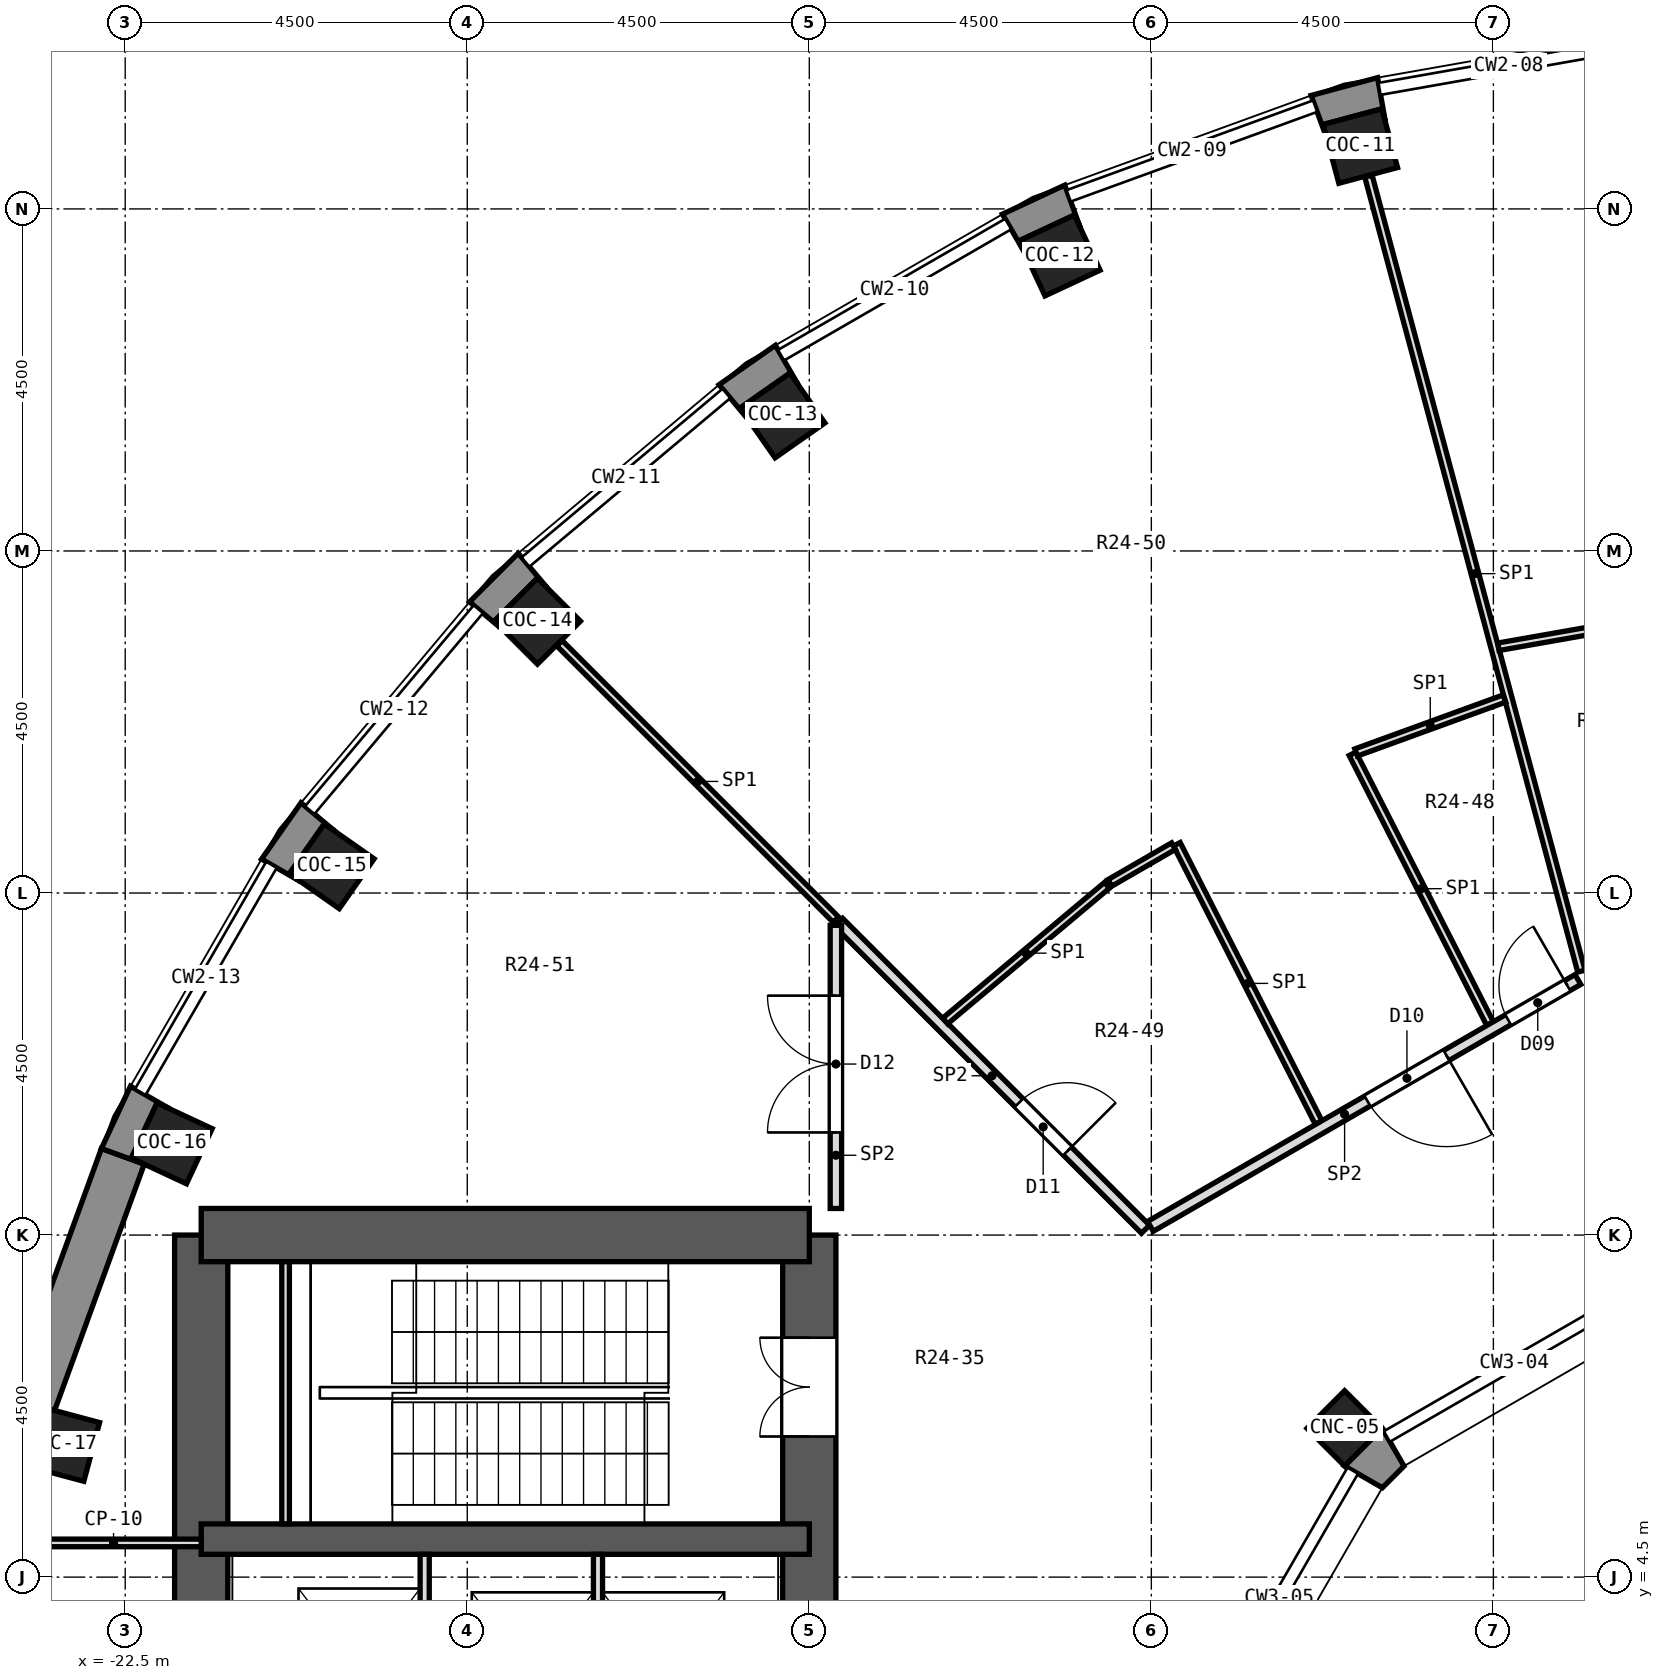
"""IFC4 building model, lengths in metres.
Left out: names, types, materials, properties, quantities, classifications, styles, units other than length and angle.
Written with IfcOpenShell. Run it as: python <this file> out.ifc"""

import sys

from ifc_helpers import new_model, si_unit, direction, frame, frame_2d, origin, origin_2d, place, context, subcontext, project, spatial, polyline, rectangle, outline, extrude, element, fill, save


model = new_model("IFC4")
c1 = context("Model", 3, precision=1e-05, world=origin(), true_north=direction((0.0, 1.0)))
c2 = subcontext(c1, "Body", "Model", "MODEL_VIEW")
j1 = project(units=[si_unit("LENGTHUNIT", "METRE"), si_unit("PLANEANGLEUNIT", "RADIAN")], contexts=[c1])
p1 = place(None, origin())
s1 = spatial("IfcSite", under=j1, at=p1, CompositionType="ELEMENT")
p2 = place(p1, origin())
s2 = spatial("IfcBuilding", under=s1, at=p2, CompositionType="ELEMENT")
p3 = place(p2, frame((0.0, 0.0, 155.8)))
s3 = spatial("IfcBuildingStorey", under=s2, at=p3, CompositionType="ELEMENT", Elevation=155.8)
for number, where, z_axis, x_axis in (
    (1, (-6.25, 23.327, -0.55), (0.0, 0.0, 1.0), (-0.259, 0.966, 0.0)),
    (2, (-10.206, 21.887, -0.55), (0.0, 0.0, 1.0), (-0.423, 0.906, 0.0)),
    (3, (-13.852, 19.782, -0.55), (0.0, 0.0, 1.0), (-0.574, 0.819, 0.0)),
    (4, (-17.077, 17.077, -0.55), (0.0, 0.0, 1.0), (-0.707, 0.707, 0.0)),
    (5, (-19.782, 13.852, -0.55), (0.0, 0.0, 1.0), (-0.819, 0.574, 0.0)),
    (6, (-21.887, 10.206, -0.55), (0.0, 0.0, 1.0), (-0.906, 0.423, 0.0)),
    (7, (-23.327, 6.25, -0.55), (0.0, 0.0, 1.0), (-0.966, 0.259, 0.0)),
):
    element("IfcColumn", number, at=place(p3, frame(where, z_axis=z_axis, x_axis=x_axis)), inside=s3, PredefinedType="COLUMN", context=c2, shape_type="SweptSolid", body=[
        extrude(rectangle(XDim=0.8, YDim=0.8, at=origin_2d()), origin(), (0.0, 0.0, 1.0), 5.55),
    ])
p4 = place(p3, frame((-6.458, 6.458, 0.0), z_axis=(0.0, 0.0, 1.0), x_axis=(-0.707106781187, 0.707106781187, 0.0)))
e8 = element("IfcColumn", 8, at=p4, inside=s3, PredefinedType="COLUMN", context=c2, shape_type="SweptSolid", body=[
    extrude(rectangle(XDim=0.7, YDim=0.7, at=origin_2d()), origin(), (0.0, 0.0, 1.0), 5.0),
])
p5 = place(p3, frame((-13.5, -9.0, 0.0), z_axis=(0.0, 0.0, 1.0), x_axis=(0.0, 1.0, 0.0)))
e9 = element("IfcWall", 9, at=p5, inside=s3, PredefinedType="SHEAR", context=c2, shape_type="SweptSolid", body=[
    extrude(rectangle(XDim=18.0, YDim=0.7, at=frame_2d((9.0, 0.0))), origin(), (0.0, 0.0, 1.0), 5.0),
])
p6 = place(p5, frame((15.35, 0.0, 0.0)))
e10 = element("IfcOpeningElement", 10, at=p6, cuts=e9, PredefinedType="OPENING", context=c2, shape_type="SweptSolid", body=[
    extrude(rectangle(XDim=1.3, YDim=2.1, at=frame_2d((0.65, 1.05))), frame((0.0, 0.362, 0.0), z_axis=(0.0, -1.0, 0.0), x_axis=(1.0, 0.0, 0.0)), (0.0, 0.0, 1.0), 0.724),
])
p7 = place(p5, frame((1.35, 0.0, 0.0)))
e11 = element("IfcOpeningElement", 11, at=p7, cuts=e9, PredefinedType="OPENING", context=c2, shape_type="SweptSolid", body=[
    extrude(rectangle(XDim=1.3, YDim=2.1, at=frame_2d((0.65, 1.05))), frame((0.0, 0.362, 0.0), z_axis=(0.0, -1.0, 0.0), x_axis=(1.0, 0.0, 0.0)), (0.0, 0.0, 1.0), 0.724),
])
p8 = place(p5, frame((7.5, 0.0, 0.0)))
e12 = element("IfcOpeningElement", 12, at=p8, cuts=e9, PredefinedType="OPENING", context=c2, shape_type="SweptSolid", body=[
    extrude(rectangle(XDim=3.0, YDim=2.4, at=frame_2d((1.5, 1.2))), frame((0.0, 0.362, 0.0), z_axis=(0.0, -1.0, 0.0), x_axis=(1.0, 0.0, 0.0)), (0.0, 0.0, 1.0), 0.724),
])
p9 = place(p3, frame((-21.5, -9.0, 0.0), z_axis=(0.0, 0.0, 1.0), x_axis=(0.0, 1.0, 0.0)))
e13 = element("IfcWall", 13, at=p9, inside=s3, PredefinedType="SHEAR", context=c2, shape_type="SweptSolid", body=[
    extrude(rectangle(XDim=18.0, YDim=0.7, at=frame_2d((9.0, 0.0))), origin(), (0.0, 0.0, 1.0), 5.0),
])
p10 = place(p9, frame((9.45, 0.0, 0.0)))
e14 = element("IfcOpeningElement", 14, at=p10, cuts=e13, PredefinedType="OPENING", context=c2, shape_type="SweptSolid", body=[
    extrude(rectangle(XDim=0.9, YDim=2.1, at=frame_2d((0.45, 1.05))), frame((0.0, 0.362, 0.0), z_axis=(0.0, -1.0, 0.0), x_axis=(1.0, 0.0, 0.0)), (0.0, 0.0, 1.0), 0.724),
])
p11 = place(p9, frame((7.65, 0.0, 0.0)))
e15 = element("IfcOpeningElement", 15, at=p11, cuts=e13, PredefinedType="OPENING", context=c2, shape_type="SweptSolid", body=[
    extrude(rectangle(XDim=0.9, YDim=2.1, at=frame_2d((0.45, 1.05))), frame((0.0, 0.362, 0.0), z_axis=(0.0, -1.0, 0.0), x_axis=(1.0, 0.0, 0.0)), (0.0, 0.0, 1.0), 0.724),
])
p12 = place(p3, frame((-13.5, 9.0, 0.0), z_axis=(0.0, 0.0, 1.0), x_axis=(-1.0, 0.0, 0.0)))
e16 = element("IfcWall", 16, at=p12, inside=s3, PredefinedType="SHEAR", context=c2, shape_type="SweptSolid", body=[
    extrude(rectangle(XDim=8.0, YDim=0.7, at=frame_2d((4.0, 0.0))), origin(), (0.0, 0.0, 1.0), 5.0),
])
p13 = place(p3, frame((-13.5, 5.0, 0.0), z_axis=(0.0, 0.0, 1.0), x_axis=(-1.0, 0.0, 0.0)))
e17 = element("IfcWall", 17, at=p13, inside=s3, PredefinedType="SHEAR", context=c2, shape_type="SweptSolid", body=[
    extrude(rectangle(XDim=8.0, YDim=0.4, at=frame_2d((4.0, 0.0))), origin(), (0.0, 0.0, 1.0), 5.0),
])
p14 = place(p3, frame((-22.531, 10.036, 0.0), z_axis=(0.0, 0.0, 1.0), x_axis=(-0.342032843455, -0.93968799822, 0.0)))
e18 = element("IfcWall", 18, at=p14, inside=s3, PredefinedType="SOLIDWALL", context=c2, shape_type="SweptSolid", body=[
    extrude(rectangle(XDim=3.45, YDim=0.6, at=frame_2d((1.725, 0.0))), origin(), (0.0, 0.0, 1.0), 4.55),
])
p15 = place(p3, origin())
e19 = element("IfcWall", 19, at=p15, inside=s3, PredefinedType="SOLIDWALL", context=c2, shape_type="SweptSolid", body=[
    extrude(outline(polyline([(-6.023, 24.227), (-6.897, 23.993), (-6.692, 23.429), (-6.74, 23.61), (-5.968, 23.817), (-5.919, 23.636), (-6.023, 24.227)])), origin(), (0.0, 0.0, 1.0), 4.55),
])
p16 = place(p3, origin())
e20 = element("IfcWall", 20, at=p16, inside=s3, PredefinedType="SOLIDWALL", context=c2, shape_type="SweptSolid", body=[
    extrude(outline(polyline([(-10.959, 22.431), (-10.659, 21.911), (-10.738, 22.081), (-10.013, 22.419), (-9.934, 22.249), (-10.139, 22.813), (-10.959, 22.431)])), origin(), (0.0, 0.0, 1.0), 4.55),
])
p17 = place(p3, origin())
e21 = element("IfcWall", 21, at=p17, inside=s3, PredefinedType="SOLIDWALL", context=c2, shape_type="SweptSolid", body=[
    extrude(outline(polyline([(-13.946, 20.706), (-14.687, 20.187), (-14.302, 19.727), (-14.409, 19.881), (-13.754, 20.34), (-13.646, 20.186), (-13.946, 20.706)])), origin(), (0.0, 0.0, 1.0), 4.55),
])
p18 = place(p3, origin())
e22 = element("IfcWall", 22, at=p18, inside=s3, PredefinedType="SOLIDWALL", context=c2, shape_type="SweptSolid", body=[
    extrude(outline(polyline([(-17.969, 17.33), (-17.51, 16.944), (-17.642, 17.077), (-17.077, 17.642), (-16.944, 17.51), (-17.33, 17.969), (-17.969, 17.33)])), origin(), (0.0, 0.0, 1.0), 4.55),
])
p19 = place(p3, origin())
e23 = element("IfcWall", 23, at=p19, inside=s3, PredefinedType="SOLIDWALL", context=c2, shape_type="SweptSolid", body=[
    extrude(outline(polyline([(-20.187, 14.687), (-20.706, 13.946), (-20.186, 13.646), (-20.34, 13.754), (-19.881, 14.409), (-19.727, 14.302), (-20.187, 14.687)])), origin(), (0.0, 0.0, 1.0), 4.55),
])
p20 = place(p3, origin())
e24 = element("IfcWall", 24, at=p20, inside=s3, PredefinedType="SOLIDWALL", context=c2, shape_type="SweptSolid", body=[
    extrude(outline(polyline([(-22.813, 10.139), (-22.249, 9.934), (-22.419, 10.013), (-22.081, 10.738), (-21.911, 10.659), (-22.431, 10.959), (-22.813, 10.139)])), origin(), (0.0, 0.0, 1.0), 4.55),
])
p21 = place(p3, origin())
e25 = element("IfcWall", 25, at=p21, inside=s3, PredefinedType="SOLIDWALL", context=c2, shape_type="SweptSolid", body=[
    extrude(outline(polyline([(-24.227, 6.023), (-23.636, 5.919), (-23.817, 5.968), (-23.61, 6.74), (-23.429, 6.692), (-23.993, 6.897), (-24.227, 6.023)])), origin(), (0.0, 0.0, 1.0), 4.55),
])
p22 = place(p3, origin())
e26 = element("IfcWall", 26, at=p22, inside=s3, PredefinedType="SOLIDWALL", context=c2, shape_type="SweptSolid", body=[
    extrude(outline(polyline([(-6.458, 5.962), (-5.961, 5.676), (-5.676, 5.961), (-5.962, 6.458), (-6.458, 5.962)])), origin(), (0.0, 0.0, 1.0), 4.55),
])
p23 = place(p3, frame((-6.144, 22.931, 0.0), z_axis=(0.0, 0.0, 1.0), x_axis=(0.258715046682, -0.965953686582, 0.0)))
e27 = element("IfcWall", 27, at=p23, inside=s3, PredefinedType="PARTITIONING", context=c2, shape_type="SweptSolid", body=[
    extrude(rectangle(XDim=10.828, YDim=0.1, at=frame_2d((5.414, 0.0))), origin(), (0.0, 0.0, 1.0), 4.55),
])
p24 = place(p3, frame((-8.665, 14.142, 0.0), z_axis=(0.0, 0.0, 1.0), x_axis=(0.453972049437, -0.891015924847, 0.0)))
e28 = element("IfcWall", 28, at=p24, inside=s3, PredefinedType="PARTITIONING", context=c2, shape_type="SweptSolid", body=[
    extrude(rectangle(XDim=4.11, YDim=0.1, at=frame_2d((2.055, 0.0))), origin(), (0.0, 0.0, 1.0), 4.55),
])
p25 = place(p3, frame((-6.353, 15.332, 0.0), z_axis=(0.0, 0.0, 1.0), x_axis=(0.454013892244, -0.890994604725, 0.0)))
e29 = element("IfcWall", 29, at=p25, inside=s3, PredefinedType="PARTITIONING", context=c2, shape_type="SweptSolid", body=[
    extrude(rectangle(XDim=3.985, YDim=0.1, at=frame_2d((1.992, 0.0))), origin(), (0.0, 0.0, 1.0), 4.55),
])
p26 = place(p3, frame((-16.787, 16.787, 0.0), z_axis=(0.0, 0.0, 1.0), x_axis=(0.707106781187, -0.707106781187, 0.0)))
e30 = element("IfcWall", 30, at=p26, inside=s3, PredefinedType="PARTITIONING", context=c2, shape_type="SweptSolid", body=[
    extrude(rectangle(XDim=5.143, YDim=0.1, at=frame_2d((2.572, 0.0))), origin(), (0.0, 0.0, 1.0), 4.55),
])
p27 = place(p3, frame((-13.115, 13.115, 0.0), z_axis=(0.0, 0.0, 1.0), x_axis=(0.707106781187, -0.707106781187, 0.0)))
e31 = element("IfcWall", 31, at=p27, inside=s3, PredefinedType="PARTITIONING", context=c2, shape_type="SweptSolid", body=[
    extrude(rectangle(XDim=5.71, YDim=0.15, at=frame_2d((2.855, 0.0))), origin(), (0.0, 0.0, 1.0), 4.55),
])
p28 = place(p27, frame((3.357, 0.0, 0.0)))
e32 = element("IfcOpeningElement", 32, at=p28, cuts=e31, PredefinedType="OPENING", context=c2, shape_type="SweptSolid", body=[
    extrude(rectangle(XDim=0.9, YDim=2.1, at=frame_2d((0.45, 1.05))), frame((0.0, 0.087, 0.0), z_axis=(0.0, -1.0, 0.0), x_axis=(1.0, 0.0, 0.0)), (0.0, 0.0, 1.0), 0.174),
])
p29 = place(p3, frame((-4.434, 16.74, 0.0), z_axis=(0.0, 0.0, 1.0), x_axis=(0.984855167118, 0.173379063906, 0.0)))
e33 = element("IfcWall", 33, at=p29, inside=s3, PredefinedType="PARTITIONING", context=c2, shape_type="SweptSolid", body=[
    extrude(rectangle(XDim=2.674, YDim=0.1, at=frame_2d((1.337, 0.0))), origin(), (0.0, 0.0, 1.0), 4.55),
])
p30 = place(p3, frame((-6.306, 15.349, 0.0), z_axis=(0.0, 0.0, 1.0), x_axis=(0.939748778635, 0.341865811474, 0.0)))
e34 = element("IfcWall", 34, at=p30, inside=s3, PredefinedType="PARTITIONING", context=c2, shape_type="SweptSolid", body=[
    extrude(rectangle(XDim=2.076, YDim=0.1, at=frame_2d((1.038, 0.0))), origin(), (0.0, 0.0, 1.0), 4.55),
])
p31 = place(p3, frame((-9.012, 9.115, 0.0), z_axis=(0.0, 0.0, 1.0), x_axis=(0.865967095912, 0.5001009786, 0.0)))
e35 = element("IfcWall", 35, at=p31, inside=s3, PredefinedType="PARTITIONING", context=c2, shape_type="SweptSolid", body=[
    extrude(rectangle(XDim=6.495, YDim=0.15, at=frame_2d((3.248, 0.0))), origin(), (0.0, 0.0, 1.0), 4.55),
])
p32 = place(p31, frame((5.434, 0.0, 0.0)))
e36 = element("IfcOpeningElement", 36, at=p32, cuts=e35, PredefinedType="OPENING", context=c2, shape_type="SweptSolid", body=[
    extrude(rectangle(XDim=0.9, YDim=2.1, at=frame_2d((0.45, 1.05))), frame((0.0, 0.087, 0.0), z_axis=(0.0, -1.0, 0.0), x_axis=(1.0, 0.0, 0.0)), (0.0, 0.0, 1.0), 0.174),
])
p33 = place(p31, frame((3.297, 0.0, 0.0)))
e37 = element("IfcOpeningElement", 37, at=p33, cuts=e35, PredefinedType="OPENING", context=c2, shape_type="SweptSolid", body=[
    extrude(rectangle(XDim=1.2, YDim=2.1, at=frame_2d((0.6, 1.05))), frame((0.0, 0.087, 0.0), z_axis=(0.0, -1.0, 0.0), x_axis=(1.0, 0.0, 0.0)), (0.0, 0.0, 1.0), 0.174),
])
p34 = place(p3, frame((-9.546, 13.633, 0.0), z_axis=(0.0, 0.0, 1.0), x_axis=(0.865903940918, 0.500210320868, 0.0)))
e38 = element("IfcWall", 38, at=p34, inside=s3, PredefinedType="PARTITIONING", context=c2, shape_type="SweptSolid", body=[
    extrude(rectangle(XDim=0.967, YDim=0.1, at=frame_2d((0.484, 0.0))), origin(), (0.0, 0.0, 1.0), 4.55),
])
p35 = place(p3, frame((-11.711, 11.817, 0.0), z_axis=(0.0, 0.0, 1.0), x_axis=(0.76626417204, 0.642525656023, 0.0)))
e39 = element("IfcWall", 39, at=p35, inside=s3, PredefinedType="PARTITIONING", context=c2, shape_type="SweptSolid", body=[
    extrude(rectangle(XDim=2.776, YDim=0.1, at=frame_2d((1.388, 0.0))), origin(), (0.0, 0.0, 1.0), 4.55),
])
p36 = place(p3, frame((-13.15, 9.35, 0.0), z_axis=(0.0, 0.0, 1.0), x_axis=(0.0, 1.0, 0.0)))
e40 = element("IfcWall", 40, at=p36, inside=s3, PredefinedType="PARTITIONING", context=c2, shape_type="SweptSolid", body=[
    extrude(rectangle(XDim=3.725, YDim=0.15, at=frame_2d((1.862, 0.0))), origin(), (0.0, 0.0, 1.0), 4.55),
])
p37 = place(p36, frame((1.0, 0.0, 0.0)))
e41 = element("IfcOpeningElement", 41, at=p37, cuts=e40, PredefinedType="OPENING", context=c2, shape_type="SweptSolid", body=[
    extrude(rectangle(XDim=1.8, YDim=2.1, at=frame_2d((0.9, 1.05))), frame((0.0, 0.087, 0.0), z_axis=(0.0, -1.0, 0.0), x_axis=(1.0, 0.0, 0.0)), (0.0, 0.0, 1.0), 0.174),
])
p38 = place(p3, frame((-21.5, 4.95, 0.0), z_axis=(0.0, 0.0, 1.0), x_axis=(-1.0, 0.0, 0.0)))
e42 = element("IfcWall", 42, at=p38, inside=s3, PredefinedType="PARTITIONING", context=c2, shape_type="SweptSolid", body=[
    extrude(rectangle(XDim=2.307, YDim=0.1, at=frame_2d((1.153, 0.0))), origin(), (0.0, 0.0, 1.0), 4.55),
])
for number, where, z_axis, x_axis in (
    (43, (-16.28, 2.2, 0.0), (0.0, 0.0, 1.0), (0.0, 1.0, 0.0)),
    (44, (-18.56, 2.2, 0.0), (0.0, 0.0, 1.0), (0.0, 1.0, 0.0)),
):
    element("IfcWall", number, at=place(p3, frame(where, z_axis=z_axis, x_axis=x_axis)), inside=s3, PredefinedType="PARTITIONING", context=c2, shape_type="SweptSolid", body=[
        extrude(rectangle(XDim=2.6, YDim=0.12, at=frame_2d((1.3, 0.0))), origin(), (0.0, 0.0, 1.0), 4.55),
    ])
p39 = place(p3, frame((-20.39, 5.2, 0.0), z_axis=(0.0, 0.0, 1.0), x_axis=(0.0, 1.0, 0.0)))
e45 = element("IfcWall", 45, at=p39, inside=s3, PredefinedType="PARTITIONING", context=c2, shape_type="SweptSolid", body=[
    extrude(rectangle(XDim=3.45, YDim=0.1, at=frame_2d((1.725, 0.0))), origin(), (0.0, 0.0, 1.0), 4.55),
])
p40 = place(p32, origin())
e46 = element("IfcDoor", 46, at=p40, inside=s3, OperationType="SINGLE_SWING_RIGHT", PredefinedType="DOOR", context=c2, shape_type="SweptSolid", body=[
    extrude(rectangle(XDim=0.9, YDim=2.1, at=frame_2d((0.45, 1.05))), frame((0.0, 0.025, 0.0), z_axis=(0.0, -1.0, 0.0), x_axis=(1.0, 0.0, 0.0)), (0.0, 0.0, 1.0), 0.05),
])
fill(e36, e46)
p41 = place(p33, frame((1.2, 0.0, 0.0), z_axis=(0.0, 0.0, 1.0), x_axis=(-1.0, 0.0, 0.0)))
e47 = element("IfcDoor", 47, at=p41, inside=s3, OperationType="SINGLE_SWING_LEFT", PredefinedType="DOOR", context=c2, shape_type="SweptSolid", body=[
    extrude(rectangle(XDim=1.2, YDim=2.1, at=frame_2d((0.6, 1.05))), frame((0.0, 0.025, 0.0), z_axis=(0.0, -1.0, 0.0), x_axis=(1.0, 0.0, 0.0)), (0.0, 0.0, 1.0), 0.05),
])
fill(e37, e47)
p42 = place(p28, origin())
e48 = element("IfcDoor", 48, at=p42, inside=s3, OperationType="SINGLE_SWING_RIGHT", PredefinedType="DOOR", context=c2, shape_type="SweptSolid", body=[
    extrude(rectangle(XDim=0.9, YDim=2.1, at=frame_2d((0.45, 1.05))), frame((0.0, 0.025, 0.0), z_axis=(0.0, -1.0, 0.0), x_axis=(1.0, 0.0, 0.0)), (0.0, 0.0, 1.0), 0.05),
])
fill(e32, e48)
p43 = place(p37, origin())
e49 = element("IfcDoor", 49, at=p43, inside=s3, OperationType="DOUBLE_DOOR_SINGLE_SWING", PredefinedType="DOOR", context=c2, shape_type="SweptSolid", body=[
    extrude(rectangle(XDim=1.8, YDim=2.1, at=frame_2d((0.9, 1.05))), frame((0.0, 0.025, 0.0), z_axis=(0.0, -1.0, 0.0), x_axis=(1.0, 0.0, 0.0)), (0.0, 0.0, 1.0), 0.05),
])
fill(e41, e49)
p44 = place(p6, origin())
e50 = element("IfcDoor", 50, at=p44, inside=s3, OperationType="DOUBLE_DOOR_SINGLE_SWING", PredefinedType="DOOR", context=c2, shape_type="SweptSolid", body=[
    extrude(rectangle(XDim=1.3, YDim=2.1, at=frame_2d((0.65, 1.05))), frame((0.0, 0.025, 0.0), z_axis=(0.0, -1.0, 0.0), x_axis=(1.0, 0.0, 0.0)), (0.0, 0.0, 1.0), 0.05),
])
fill(e10, e50)
save(model, sys.argv[1])
